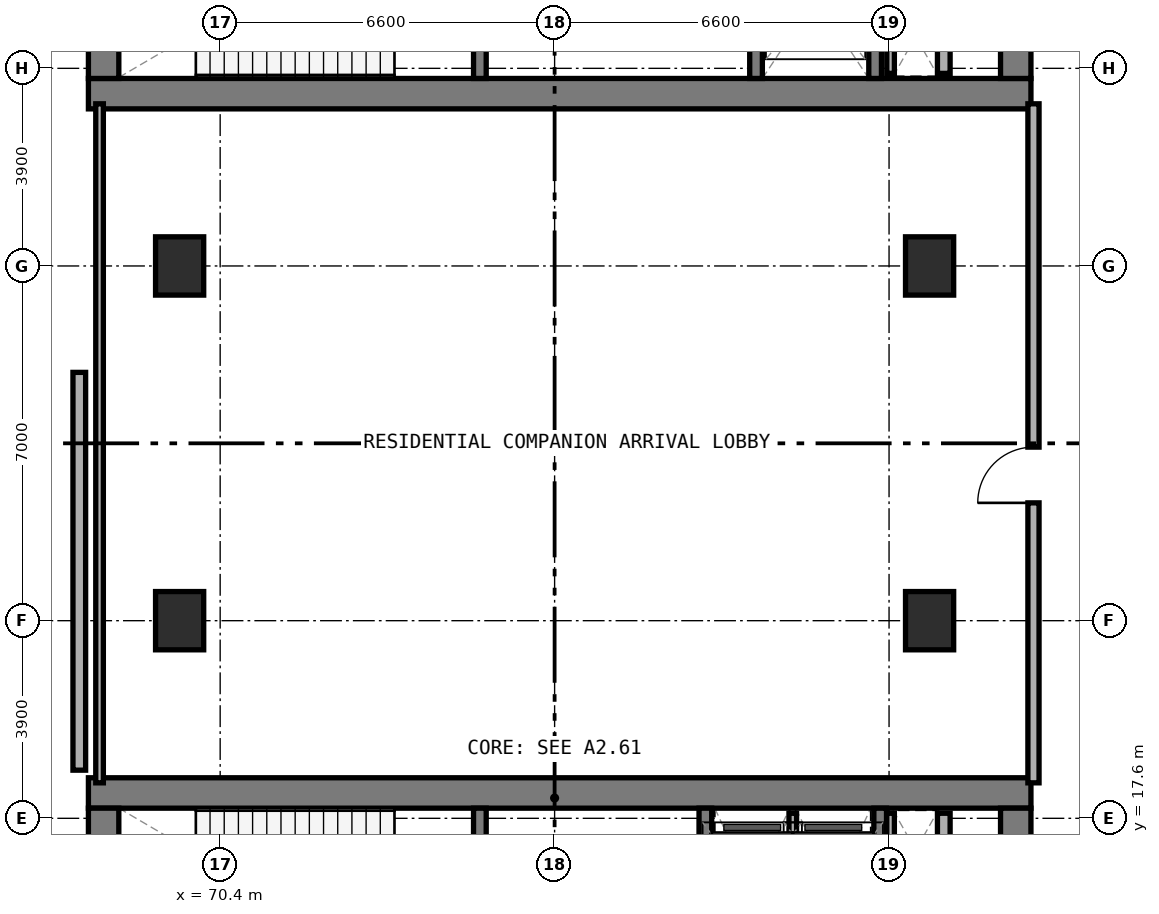
"""IFC4 building model, lengths in metres.
Left out: names, types, materials, properties, quantities, classifications, styles, units other than length and angle.
Written with IfcOpenShell. Run it as: python <this file> out.ifc"""

import sys

from ifc_helpers import new_model, si_unit, direction, frame, frame_2d, origin, origin_2d, place, context, subcontext, project, spatial, rectangle, extrude, element, fill, save


model = new_model("IFC4")
c1 = context("Model", 3, precision=1e-05, world=origin(), true_north=direction((0.0, 1.0)))
c2 = subcontext(c1, "Body", "Model", "MODEL_VIEW")
j1 = project(units=[si_unit("LENGTHUNIT", "METRE"), si_unit("PLANEANGLEUNIT", "RADIAN")], contexts=[c1])
p1 = place(None, origin())
s1 = spatial("IfcSite", under=j1, at=p1, CompositionType="ELEMENT")
p2 = place(p1, origin())
s2 = spatial("IfcBuilding", under=s1, at=p2, CompositionType="ELEMENT")
p3 = place(p2, origin())
s3 = spatial("IfcBuildingStorey", under=s2, at=p3, CompositionType="ELEMENT", Elevation=0.0)
p4 = place(p3, frame((67.8, 31.9, 0.0), z_axis=(0.0, 0.0, 1.0), x_axis=(1.0, 0.0, 0.0)))
e1 = element("IfcWall", 1, at=p4, inside=s3, PredefinedType="SHEAR", context=c2, shape_type="SweptSolid", body=[
    extrude(rectangle(XDim=18.6, YDim=0.6, at=frame_2d((9.3, 0.0))), origin(), (0.0, 0.0, 1.0), 5.4),
])
for number, where, z_axis, x_axis in (
    (2, (68.1, 32.2, 0.0), (0.0, 0.0, 1.0), (0.0, 1.0, 0.0)),
    (3, (86.1, 32.2, 0.0), (0.0, 0.0, 1.0), (0.0, 1.0, 0.0)),
):
    element("IfcWall", number, at=place(p3, frame(where, z_axis=z_axis, x_axis=x_axis)), inside=s3, PredefinedType="SHEAR", context=c2, shape_type="SweptSolid", body=[
        extrude(rectangle(XDim=3.16, YDim=0.6, at=frame_2d((1.58, 0.0))), origin(), (0.0, 0.0, 1.0), 5.4),
    ])
p5 = place(p3, frame((75.525, 32.2, 0.0), z_axis=(0.0, 0.0, 1.0), x_axis=(0.0, 1.0, 0.0)))
e4 = element("IfcWall", 4, at=p5, inside=s3, PredefinedType="STANDARD", context=c2, shape_type="SweptSolid", body=[
    extrude(rectangle(XDim=3.16, YDim=0.25, at=frame_2d((1.58, 0.0))), origin(), (0.0, 0.0, 1.0), 5.05),
])
p6 = place(p5, frame((0.98, 0.0, 0.0)))
e5 = element("IfcOpeningElement", 5, at=p6, cuts=e4, PredefinedType="OPENING", context=c2, shape_type="SweptSolid", body=[
    extrude(rectangle(XDim=1.1, YDim=2.15, at=frame_2d((0.55, 1.075))), frame((0.0, 0.135, 0.0), z_axis=(0.0, -1.0, 0.0), x_axis=(1.0, 0.0, 0.0)), (0.0, 0.0, 1.0), 0.27),
])
p7 = place(p3, frame((80.975, 32.2, 0.0), z_axis=(0.0, 0.0, 1.0), x_axis=(0.0, 1.0, 0.0)))
e6 = element("IfcWall", 6, at=p7, inside=s3, PredefinedType="STANDARD", context=c2, shape_type="SweptSolid", body=[
    extrude(rectangle(XDim=3.16, YDim=0.25, at=frame_2d((1.58, 0.0))), origin(), (0.0, 0.0, 1.0), 5.05),
])
p8 = place(p7, frame((0.98, 0.0, 0.0)))
e7 = element("IfcOpeningElement", 7, at=p8, cuts=e6, PredefinedType="OPENING", context=c2, shape_type="SweptSolid", body=[
    extrude(rectangle(XDim=1.1, YDim=2.15, at=frame_2d((0.55, 1.075))), frame((0.0, 0.135, 0.0), z_axis=(0.0, -1.0, 0.0), x_axis=(1.0, 0.0, 0.0)), (0.0, 0.0, 1.0), 0.27),
])
p9 = place(p3, frame((83.325, 32.2, 0.0), z_axis=(0.0, 0.0, 1.0), x_axis=(0.0, 1.0, 0.0)))
e8 = element("IfcWall", 8, at=p9, inside=s3, PredefinedType="STANDARD", context=c2, shape_type="SweptSolid", body=[
    extrude(rectangle(XDim=3.16, YDim=0.25, at=frame_2d((1.58, 0.0))), origin(), (0.0, 0.0, 1.0), 5.05),
])
p10 = place(p3, frame((67.8, 18.1, 0.0), z_axis=(0.0, 0.0, 1.0), x_axis=(1.0, 0.0, 0.0)))
e9 = element("IfcWall", 9, at=p10, inside=s3, PredefinedType="SHEAR", context=c2, shape_type="SweptSolid", body=[
    extrude(rectangle(XDim=18.6, YDim=0.6, at=frame_2d((9.3, 0.0))), origin(), (0.0, 0.0, 1.0), 5.4),
])
for number, where, z_axis, x_axis in (
    (10, (68.1, 14.64, 0.0), (0.0, 0.0, 1.0), (0.0, 1.0, 0.0)),
    (11, (86.1, 14.64, 0.0), (0.0, 0.0, 1.0), (0.0, 1.0, 0.0)),
):
    element("IfcWall", number, at=place(p3, frame(where, z_axis=z_axis, x_axis=x_axis)), inside=s3, PredefinedType="SHEAR", context=c2, shape_type="SweptSolid", body=[
        extrude(rectangle(XDim=3.16, YDim=0.6, at=frame_2d((1.58, 0.0))), origin(), (0.0, 0.0, 1.0), 5.4),
    ])
p11 = place(p3, frame((75.525, 14.64, 0.0), z_axis=(0.0, 0.0, 1.0), x_axis=(0.0, 1.0, 0.0)))
e12 = element("IfcWall", 12, at=p11, inside=s3, PredefinedType="STANDARD", context=c2, shape_type="SweptSolid", body=[
    extrude(rectangle(XDim=3.16, YDim=0.25, at=frame_2d((1.58, 0.0))), origin(), (0.0, 0.0, 1.0), 5.05),
])
p12 = place(p11, frame((0.98, 0.0, 0.0)))
e13 = element("IfcOpeningElement", 13, at=p12, cuts=e12, PredefinedType="OPENING", context=c2, shape_type="SweptSolid", body=[
    extrude(rectangle(XDim=1.1, YDim=2.15, at=frame_2d((0.55, 1.075))), frame((0.0, 0.135, 0.0), z_axis=(0.0, -1.0, 0.0), x_axis=(1.0, 0.0, 0.0)), (0.0, 0.0, 1.0), 0.27),
])
for number, where, z_axis, x_axis in (
    (14, (79.975, 14.64, 0.0), (0.0, 0.0, 1.0), (0.0, 1.0, 0.0)),
    (15, (83.425, 14.64, 0.0), (0.0, 0.0, 1.0), (0.0, 1.0, 0.0)),
):
    element("IfcWall", number, at=place(p3, frame(where, z_axis=z_axis, x_axis=x_axis)), inside=s3, PredefinedType="STANDARD", context=c2, shape_type="SweptSolid", body=[
        extrude(rectangle(XDim=3.16, YDim=0.25, at=frame_2d((1.58, 0.0))), origin(), (0.0, 0.0, 1.0), 5.05),
    ])
for number, where, z_axis, x_axis in (
    (16, (69.6, 21.5, 0.0), (0.0, 0.0, 1.0), (1.0, 0.0, 0.0)),
    (17, (69.6, 28.5, 0.0), (0.0, 0.0, 1.0), (1.0, 0.0, 0.0)),
    (18, (84.4, 21.5, 0.0), (0.0, 0.0, 1.0), (1.0, 0.0, 0.0)),
    (19, (84.4, 28.5, 0.0), (0.0, 0.0, 1.0), (1.0, 0.0, 0.0)),
):
    element("IfcColumn", number, at=place(p3, frame(where, z_axis=z_axis, x_axis=x_axis)), inside=s3, PredefinedType="COLUMN", context=c2, shape_type="SweptSolid", body=[
        extrude(rectangle(XDim=0.95, YDim=1.15, at=origin_2d()), origin(), (0.0, 0.0, 1.0), 5.4),
    ])
p13 = place(p3, frame((83.63, 32.3, 0.0), z_axis=(0.0, 0.0, 1.0), x_axis=(0.0, 1.0, 0.0)))
e20 = element("IfcWall", 20, at=p13, inside=s3, PredefinedType="PARTITIONING", context=c2, shape_type="SweptSolid", body=[
    extrude(rectangle(XDim=1.62, YDim=0.15, at=frame_2d((0.81, 0.0))), origin(), (0.0, 0.0, 1.0), 4.525),
])
p14 = place(p3, frame((84.68, 32.3, 0.0), z_axis=(0.0, 0.0, 1.0), x_axis=(0.0, 1.0, 0.0)))
e21 = element("IfcWall", 21, at=p14, inside=s3, PredefinedType="SOLIDWALL", context=c2, shape_type="SweptSolid", body=[
    extrude(rectangle(XDim=1.62, YDim=0.25, at=frame_2d((0.81, 0.0))), origin(), (0.0, 0.0, 1.0), 5.05),
])
p15 = place(p3, frame((83.63, 16.08, 0.0), z_axis=(0.0, 0.0, 1.0), x_axis=(0.0, 1.0, 0.0)))
e22 = element("IfcWall", 22, at=p15, inside=s3, PredefinedType="PARTITIONING", context=c2, shape_type="SweptSolid", body=[
    extrude(rectangle(XDim=1.62, YDim=0.15, at=frame_2d((0.81, 0.0))), origin(), (0.0, 0.0, 1.0), 4.525),
])
p16 = place(p3, frame((84.68, 16.08, 0.0), z_axis=(0.0, 0.0, 1.0), x_axis=(0.0, 1.0, 0.0)))
e23 = element("IfcWall", 23, at=p16, inside=s3, PredefinedType="SOLIDWALL", context=c2, shape_type="SweptSolid", body=[
    extrude(rectangle(XDim=1.62, YDim=0.25, at=frame_2d((0.81, 0.0))), origin(), (0.0, 0.0, 1.0), 5.05),
])
p17 = place(p3, frame((81.7, 14.74, 0.0), z_axis=(0.0, 0.0, 1.0), x_axis=(0.0, 1.0, 0.0)))
e24 = element("IfcWall", 24, at=p17, inside=s3, PredefinedType="PARTITIONING", context=c2, shape_type="SweptSolid", body=[
    extrude(rectangle(XDim=2.96, YDim=0.15, at=frame_2d((1.48, 0.0))), origin(), (0.0, 0.0, 1.0), 5.05),
])
p18 = place(p3, frame((67.62, 18.55, 0.0), z_axis=(0.0, 0.0, 1.0), x_axis=(0.0, 1.0, 0.0)))
e25 = element("IfcWall", 25, at=p18, inside=s3, PredefinedType="SOLIDWALL", context=c2, shape_type="SweptSolid", body=[
    extrude(rectangle(XDim=7.85, YDim=0.25, at=frame_2d((3.925, 0.0))), origin(), (0.0, 0.0, 1.0), 4.525),
])
p19 = place(p3, frame((68.02, 18.3, 0.0), z_axis=(0.0, 0.0, 1.0), x_axis=(0.0, 1.0, 0.0)))
e26 = element("IfcWall", 26, at=p19, inside=s3, PredefinedType="PARTITIONING", context=c2, shape_type="SweptSolid", body=[
    extrude(rectangle(XDim=13.4, YDim=0.15, at=frame_2d((6.7, 0.0))), origin(), (0.0, 0.0, 1.0), 4.525),
])
p20 = place(p3, frame((86.45, 18.3, 0.0), z_axis=(0.0, 0.0, 1.0), x_axis=(0.0, 1.0, 0.0)))
e27 = element("IfcWall", 27, at=p20, inside=s3, PredefinedType="SOLIDWALL", context=c2, shape_type="SweptSolid", body=[
    extrude(rectangle(XDim=13.4, YDim=0.22, at=frame_2d((6.7, 0.0))), origin(), (0.0, 0.0, 1.0), 4.525),
])
p21 = place(p20, frame((5.525, 0.0, 0.0)))
e28 = element("IfcOpeningElement", 28, at=p21, cuts=e27, PredefinedType="OPENING", context=c2, shape_type="SweptSolid", body=[
    extrude(rectangle(XDim=1.1, YDim=2.1, at=frame_2d((0.55, 1.05))), frame((0.0, 0.12, 0.0), z_axis=(0.0, -1.0, 0.0), x_axis=(1.0, 0.0, 0.0)), (0.0, 0.0, 1.0), 0.24),
])
p22 = place(p21, origin())
e29 = element("IfcDoor", 29, at=p22, inside=s3, OperationType="SINGLE_SWING_LEFT", PredefinedType="DOOR", context=c2, shape_type="SweptSolid", body=[
    extrude(rectangle(XDim=1.1, YDim=2.1, at=frame_2d((0.55, 1.05))), frame((0.0, 0.025, 0.0), z_axis=(0.0, -1.0, 0.0), x_axis=(1.0, 0.0, 0.0)), (0.0, 0.0, 1.0), 0.05),
])
fill(e28, e29)
save(model, sys.argv[1])
